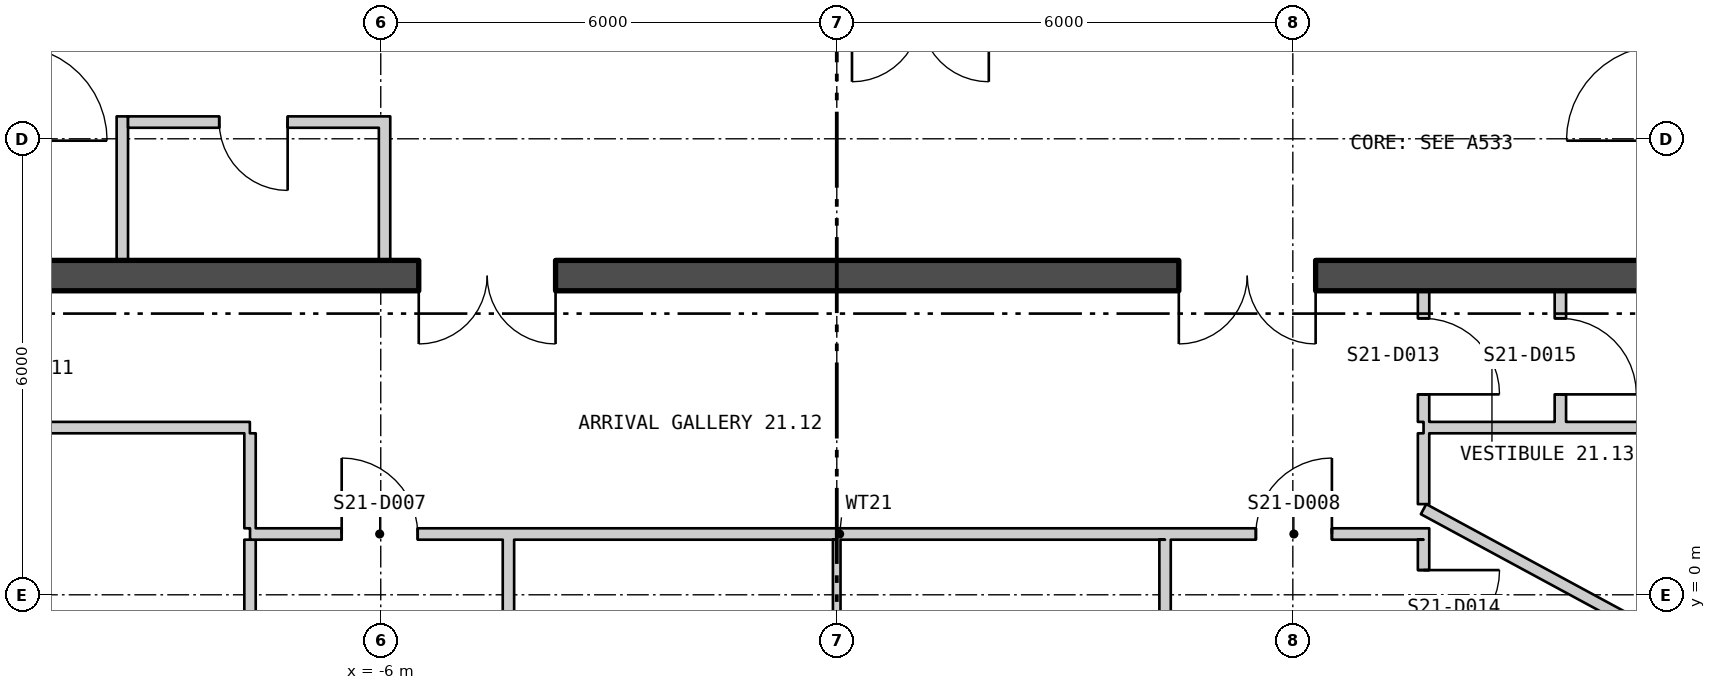
"""IFC4 building model, lengths in metres.
Left out: names, types, materials, properties, quantities, classifications, styles, units other than length and angle.
Written with IfcOpenShell. Run it as: python <this file> out.ifc"""

import sys

from ifc_helpers import new_model, si_unit, direction, frame, frame_2d, origin, place, context, subcontext, project, spatial, polyline, rectangle, outline, extrude, element, fill, save


model = new_model("IFC4")
c1 = context("Model", 3, precision=1e-05, world=origin(), true_north=direction((0.0, 1.0)))
c2 = subcontext(c1, "Body", "Model", "MODEL_VIEW")
j1 = project(units=[si_unit("LENGTHUNIT", "METRE"), si_unit("PLANEANGLEUNIT", "RADIAN")], contexts=[c1])
p1 = place(None, origin())
s1 = spatial("IfcSite", under=j1, at=p1, CompositionType="ELEMENT")
p2 = place(p1, origin())
s2 = spatial("IfcBuilding", under=s1, at=p2, CompositionType="ELEMENT")
p3 = place(p2, frame((0.0, 0.0, 280.5)))
s3 = spatial("IfcBuildingStorey", under=s2, at=p3, CompositionType="ELEMENT", Elevation=280.5)
p4 = place(p3, frame((-25.385, 15.619, -0.18), z_axis=(0.0, 0.0, 1.0), x_axis=(0.500000711659, -0.866024992908, 0.0)))
e1 = element("IfcWall", 1, at=p4, inside=s3, PredefinedType="SOLIDWALL", context=c2, shape_type="SweptSolid", body=[
    extrude(outline(polyline([(-0.13, -0.225), (45.87, -0.225), (45.61, 0.225), (0.13, 0.225), (-0.13, -0.225)])), origin(), (0.0, 0.0, 1.0), 3.68),
])
p5 = place(p4, frame((1.424, 0.0, 1.08)))
e2 = element("IfcOpeningElement", 2, at=p5, cuts=e1, PredefinedType="OPENING", context=c2, shape_type="SweptSolid", body=[
    extrude(rectangle(XDim=2.4, YDim=2.0, at=frame_2d((1.2, 1.0))), frame((0.0, 0.235, 0.0), z_axis=(0.0, -1.0, 0.0), x_axis=(1.0, 0.0, 0.0)), (0.0, 0.0, 1.0), 0.47),
])
p6 = place(p4, frame((5.893, 0.0, 1.08)))
e3 = element("IfcOpeningElement", 3, at=p6, cuts=e1, PredefinedType="OPENING", context=c2, shape_type="SweptSolid", body=[
    extrude(rectangle(XDim=2.4, YDim=2.0, at=frame_2d((1.2, 1.0))), frame((0.0, 0.235, 0.0), z_axis=(0.0, -1.0, 0.0), x_axis=(1.0, 0.0, 0.0)), (0.0, 0.0, 1.0), 0.47),
])
p7 = place(p4, frame((10.401, 0.0, 1.08)))
e4 = element("IfcOpeningElement", 4, at=p7, cuts=e1, PredefinedType="OPENING", context=c2, shape_type="SweptSolid", body=[
    extrude(rectangle(XDim=2.4, YDim=2.0, at=frame_2d((1.2, 1.0))), frame((0.0, 0.235, 0.0), z_axis=(0.0, -1.0, 0.0), x_axis=(1.0, 0.0, 0.0)), (0.0, 0.0, 1.0), 0.47),
])
p8 = place(p4, frame((14.909, 0.0, 1.08)))
e5 = element("IfcOpeningElement", 5, at=p8, cuts=e1, PredefinedType="OPENING", context=c2, shape_type="SweptSolid", body=[
    extrude(rectangle(XDim=2.4, YDim=2.0, at=frame_2d((1.2, 1.0))), frame((0.0, 0.235, 0.0), z_axis=(0.0, -1.0, 0.0), x_axis=(1.0, 0.0, 0.0)), (0.0, 0.0, 1.0), 0.47),
])
p9 = place(p4, frame((19.416, 0.0, 1.08)))
e6 = element("IfcOpeningElement", 6, at=p9, cuts=e1, PredefinedType="OPENING", context=c2, shape_type="SweptSolid", body=[
    extrude(rectangle(XDim=2.4, YDim=2.0, at=frame_2d((1.2, 1.0))), frame((0.0, 0.235, 0.0), z_axis=(0.0, -1.0, 0.0), x_axis=(1.0, 0.0, 0.0)), (0.0, 0.0, 1.0), 0.47),
])
p10 = place(p4, frame((23.924, 0.0, 1.08)))
e7 = element("IfcOpeningElement", 7, at=p10, cuts=e1, PredefinedType="OPENING", context=c2, shape_type="SweptSolid", body=[
    extrude(rectangle(XDim=2.4, YDim=2.0, at=frame_2d((1.2, 1.0))), frame((0.0, 0.235, 0.0), z_axis=(0.0, -1.0, 0.0), x_axis=(1.0, 0.0, 0.0)), (0.0, 0.0, 1.0), 0.47),
])
p11 = place(p4, frame((28.431, 0.0, 1.08)))
e8 = element("IfcOpeningElement", 8, at=p11, cuts=e1, PredefinedType="OPENING", context=c2, shape_type="SweptSolid", body=[
    extrude(rectangle(XDim=2.4, YDim=2.0, at=frame_2d((1.2, 1.0))), frame((0.0, 0.235, 0.0), z_axis=(0.0, -1.0, 0.0), x_axis=(1.0, 0.0, 0.0)), (0.0, 0.0, 1.0), 0.47),
])
p12 = place(p4, frame((32.939, 0.0, 1.08)))
e9 = element("IfcOpeningElement", 9, at=p12, cuts=e1, PredefinedType="OPENING", context=c2, shape_type="SweptSolid", body=[
    extrude(rectangle(XDim=2.4, YDim=2.0, at=frame_2d((1.2, 1.0))), frame((0.0, 0.235, 0.0), z_axis=(0.0, -1.0, 0.0), x_axis=(1.0, 0.0, 0.0)), (0.0, 0.0, 1.0), 0.47),
])
p13 = place(p4, frame((37.447, 0.0, 1.08)))
e10 = element("IfcOpeningElement", 10, at=p13, cuts=e1, PredefinedType="OPENING", context=c2, shape_type="SweptSolid", body=[
    extrude(rectangle(XDim=2.4, YDim=2.0, at=frame_2d((1.2, 1.0))), frame((0.0, 0.235, 0.0), z_axis=(0.0, -1.0, 0.0), x_axis=(1.0, 0.0, 0.0)), (0.0, 0.0, 1.0), 0.47),
])
p14 = place(p4, frame((41.916, 0.0, 1.08)))
e11 = element("IfcOpeningElement", 11, at=p14, cuts=e1, PredefinedType="OPENING", context=c2, shape_type="SweptSolid", body=[
    extrude(rectangle(XDim=2.4, YDim=2.0, at=frame_2d((1.2, 1.0))), frame((0.0, 0.235, 0.0), z_axis=(0.0, -1.0, 0.0), x_axis=(1.0, 0.0, 0.0)), (0.0, 0.0, 1.0), 0.47),
])
p15 = place(p3, frame((2.515, -23.993, -0.18), z_axis=(0.0, 0.0, 1.0), x_axis=(0.500000711659, 0.866024992908, 0.0)))
e12 = element("IfcWall", 12, at=p15, inside=s3, PredefinedType="SOLIDWALL", context=c2, shape_type="SweptSolid", body=[
    extrude(outline(polyline([(-0.13, -0.225), (45.87, -0.225), (45.61, 0.225), (0.13, 0.225), (-0.13, -0.225)])), origin(), (0.0, 0.0, 1.0), 3.68),
])
p16 = place(p15, frame((1.424, 0.0, 1.08)))
e13 = element("IfcOpeningElement", 13, at=p16, cuts=e12, PredefinedType="OPENING", context=c2, shape_type="SweptSolid", body=[
    extrude(rectangle(XDim=2.4, YDim=2.0, at=frame_2d((1.2, 1.0))), frame((0.0, 0.235, 0.0), z_axis=(0.0, -1.0, 0.0), x_axis=(1.0, 0.0, 0.0)), (0.0, 0.0, 1.0), 0.47),
])
p17 = place(p15, frame((5.893, 0.0, 1.08)))
e14 = element("IfcOpeningElement", 14, at=p17, cuts=e12, PredefinedType="OPENING", context=c2, shape_type="SweptSolid", body=[
    extrude(rectangle(XDim=2.4, YDim=2.0, at=frame_2d((1.2, 1.0))), frame((0.0, 0.235, 0.0), z_axis=(0.0, -1.0, 0.0), x_axis=(1.0, 0.0, 0.0)), (0.0, 0.0, 1.0), 0.47),
])
p18 = place(p15, frame((10.401, 0.0, 1.08)))
e15 = element("IfcOpeningElement", 15, at=p18, cuts=e12, PredefinedType="OPENING", context=c2, shape_type="SweptSolid", body=[
    extrude(rectangle(XDim=2.4, YDim=2.0, at=frame_2d((1.2, 1.0))), frame((0.0, 0.235, 0.0), z_axis=(0.0, -1.0, 0.0), x_axis=(1.0, 0.0, 0.0)), (0.0, 0.0, 1.0), 0.47),
])
p19 = place(p15, frame((14.909, 0.0, 1.08)))
e16 = element("IfcOpeningElement", 16, at=p19, cuts=e12, PredefinedType="OPENING", context=c2, shape_type="SweptSolid", body=[
    extrude(rectangle(XDim=2.4, YDim=2.0, at=frame_2d((1.2, 1.0))), frame((0.0, 0.235, 0.0), z_axis=(0.0, -1.0, 0.0), x_axis=(1.0, 0.0, 0.0)), (0.0, 0.0, 1.0), 0.47),
])
p20 = place(p15, frame((19.416, 0.0, 1.08)))
e17 = element("IfcOpeningElement", 17, at=p20, cuts=e12, PredefinedType="OPENING", context=c2, shape_type="SweptSolid", body=[
    extrude(rectangle(XDim=2.4, YDim=2.0, at=frame_2d((1.2, 1.0))), frame((0.0, 0.235, 0.0), z_axis=(0.0, -1.0, 0.0), x_axis=(1.0, 0.0, 0.0)), (0.0, 0.0, 1.0), 0.47),
])
p21 = place(p15, frame((28.431, 0.0, 1.08)))
e18 = element("IfcOpeningElement", 18, at=p21, cuts=e12, PredefinedType="OPENING", context=c2, shape_type="SweptSolid", body=[
    extrude(rectangle(XDim=2.4, YDim=2.0, at=frame_2d((1.2, 1.0))), frame((0.0, 0.235, 0.0), z_axis=(0.0, -1.0, 0.0), x_axis=(1.0, 0.0, 0.0)), (0.0, 0.0, 1.0), 0.47),
])
p22 = place(p15, frame((37.447, 0.0, 1.08)))
e19 = element("IfcOpeningElement", 19, at=p22, cuts=e12, PredefinedType="OPENING", context=c2, shape_type="SweptSolid", body=[
    extrude(rectangle(XDim=2.4, YDim=2.0, at=frame_2d((1.2, 1.0))), frame((0.0, 0.235, 0.0), z_axis=(0.0, -1.0, 0.0), x_axis=(1.0, 0.0, 0.0)), (0.0, 0.0, 1.0), 0.47),
])
p23 = place(p15, frame((41.916, 0.0, 1.08)))
e20 = element("IfcOpeningElement", 20, at=p23, cuts=e12, PredefinedType="OPENING", context=c2, shape_type="SweptSolid", body=[
    extrude(rectangle(XDim=2.4, YDim=2.0, at=frame_2d((1.2, 1.0))), frame((0.0, 0.235, 0.0), z_axis=(0.0, -1.0, 0.0), x_axis=(1.0, 0.0, 0.0)), (0.0, 0.0, 1.0), 0.47),
])
p24 = place(p3, frame((-14.5, 4.2, 0.0), z_axis=(0.0, 0.0, 1.0), x_axis=(1.0, 0.0, 0.0)))
e21 = element("IfcWall", 21, at=p24, inside=s3, PredefinedType="SHEAR", context=c2, shape_type="SweptSolid", body=[
    extrude(rectangle(XDim=29.0, YDim=0.4, at=frame_2d((14.5, 0.0))), origin(), (0.0, 0.0, 1.0), 3.7),
])
p25 = place(p24, frame((9.0, 0.0, 0.0)))
e22 = element("IfcOpeningElement", 22, at=p25, cuts=e21, PredefinedType="OPENING", context=c2, shape_type="SweptSolid", body=[
    extrude(rectangle(XDim=1.8, YDim=2.4, at=frame_2d((0.9, 1.2))), frame((0.0, 0.21, 0.0), z_axis=(0.0, -1.0, 0.0), x_axis=(1.0, 0.0, 0.0)), (0.0, 0.0, 1.0), 0.42),
])
p26 = place(p24, frame((19.0, 0.0, 0.0)))
e23 = element("IfcOpeningElement", 23, at=p26, cuts=e21, PredefinedType="OPENING", context=c2, shape_type="SweptSolid", body=[
    extrude(rectangle(XDim=1.8, YDim=2.4, at=frame_2d((0.9, 1.2))), frame((0.0, 0.21, 0.0), z_axis=(0.0, -1.0, 0.0), x_axis=(1.0, 0.0, 0.0)), (0.0, 0.0, 1.0), 0.42),
])
for number, where, z_axis, x_axis in (
    (24, (-9.4, 4.4, 0.0), (0.0, 0.0, 1.0), (0.0, 1.0, 0.0)),
    (25, (-5.95, 4.4, 0.0), (0.0, 0.0, 1.0), (0.0, 1.0, 0.0)),
):
    element("IfcWall", number, at=place(p3, frame(where, z_axis=z_axis, x_axis=x_axis)), inside=s3, PredefinedType="PARTITIONING", context=c2, shape_type="SweptSolid", body=[
        extrude(rectangle(XDim=1.895, YDim=0.15, at=frame_2d((0.948, 0.0))), origin(), (0.0, 0.0, 1.0), 3.7),
    ])
p27 = place(p3, frame((-9.325, 6.22, 0.0), z_axis=(0.0, 0.0, 1.0), x_axis=(1.0, 0.0, 0.0)))
e26 = element("IfcWall", 26, at=p27, inside=s3, PredefinedType="PARTITIONING", context=c2, shape_type="SweptSolid", body=[
    extrude(rectangle(XDim=3.3, YDim=0.15, at=frame_2d((1.65, 0.0))), origin(), (0.0, 0.0, 1.0), 3.7),
])
p28 = place(p27, frame((1.2, 0.0, 0.0)))
e27 = element("IfcOpeningElement", 27, at=p28, cuts=e26, PredefinedType="OPENING", context=c2, shape_type="SweptSolid", body=[
    extrude(rectangle(XDim=0.9, YDim=2.1, at=frame_2d((0.45, 1.05))), frame((0.0, 0.085, 0.0), z_axis=(0.0, -1.0, 0.0), x_axis=(1.0, 0.0, 0.0)), (0.0, 0.0, 1.0), 0.17),
])
p29 = place(p3, frame((-16.225, 2.2, 0.0), z_axis=(0.0, 0.0, 1.0), x_axis=(1.0, 0.0, 0.0)))
e28 = element("IfcWall", 28, at=p29, inside=s3, PredefinedType="PARTITIONING", context=c2, shape_type="SweptSolid", body=[
    extrude(rectangle(XDim=8.503, YDim=0.15, at=frame_2d((4.252, 0.0))), origin(), (0.0, 0.0, 1.0), 3.7),
])
p30 = place(p3, frame((-7.72, -0.588, 0.0), z_axis=(0.0, 0.0, 1.0), x_axis=(0.0, 1.0, 0.0)))
e29 = element("IfcWall", 29, at=p30, inside=s3, PredefinedType="PARTITIONING", context=c2, shape_type="SweptSolid", body=[
    extrude(rectangle(XDim=1.313, YDim=0.15, at=frame_2d((0.656, 0.0))), origin(), (0.0, 0.0, 1.0), 3.7),
])
p31 = place(p3, frame((-7.72, 0.8, 0.0), z_axis=(0.0, 0.0, 1.0), x_axis=(1.0, 0.0, 0.0)))
e30 = element("IfcWall", 30, at=p31, inside=s3, PredefinedType="PARTITIONING", context=c2, shape_type="SweptSolid", body=[
    extrude(rectangle(XDim=15.515, YDim=0.15, at=frame_2d((7.758, 0.0))), origin(), (0.0, 0.0, 1.0), 3.7),
])
p32 = place(p31, frame((1.206, 0.0, 0.0)))
e31 = element("IfcOpeningElement", 31, at=p32, cuts=e30, PredefinedType="OPENING", context=c2, shape_type="SweptSolid", body=[
    extrude(rectangle(XDim=1.0, YDim=2.1, at=frame_2d((0.5, 1.05))), frame((0.0, 0.085, 0.0), z_axis=(0.0, -1.0, 0.0), x_axis=(1.0, 0.0, 0.0)), (0.0, 0.0, 1.0), 0.17),
])
p33 = place(p31, frame((13.234, 0.0, 0.0)))
e32 = element("IfcOpeningElement", 32, at=p33, cuts=e30, PredefinedType="OPENING", context=c2, shape_type="SweptSolid", body=[
    extrude(rectangle(XDim=1.0, YDim=2.1, at=frame_2d((0.5, 1.05))), frame((0.0, 0.085, 0.0), z_axis=(0.0, -1.0, 0.0), x_axis=(1.0, 0.0, 0.0)), (0.0, 0.0, 1.0), 0.17),
])
p34 = place(p3, frame((-7.72, 0.875, 0.0), z_axis=(0.0, 0.0, 1.0), x_axis=(0.0, 1.0, 0.0)))
e33 = element("IfcWall", 33, at=p34, inside=s3, PredefinedType="PARTITIONING", context=c2, shape_type="SweptSolid", body=[
    extrude(rectangle(XDim=1.25, YDim=0.15, at=frame_2d((0.625, 0.0))), origin(), (0.0, 0.0, 1.0), 3.7),
])
p35 = place(p3, frame((-4.32, -3.48, 0.0), z_axis=(0.0, 0.0, 1.0), x_axis=(0.0, 1.0, 0.0)))
e34 = element("IfcWall", 34, at=p35, inside=s3, PredefinedType="PARTITIONING", context=c2, shape_type="SweptSolid", body=[
    extrude(rectangle(XDim=4.205, YDim=0.15, at=frame_2d((2.103, 0.0))), origin(), (0.0, 0.0, 1.0), 3.7),
])
p36 = place(p35, frame((0.2, 0.0, 0.0)))
e35 = element("IfcOpeningElement", 35, at=p36, cuts=e34, PredefinedType="OPENING", context=c2, shape_type="SweptSolid", body=[
    extrude(rectangle(XDim=1.0, YDim=2.1, at=frame_2d((0.5, 1.05))), frame((0.0, 0.085, 0.0), z_axis=(0.0, -1.0, 0.0), x_axis=(1.0, 0.0, 0.0)), (0.0, 0.0, 1.0), 0.17),
])
p37 = place(p3, frame((-0.001, 0.725, 0.0), z_axis=(0.0, 0.0, 1.0), x_axis=(0.000235294111, -0.999999972318, 0.0)))
e36 = element("IfcWall", 36, at=p37, inside=s3, PredefinedType="PARTITIONING", context=c2, shape_type="SweptSolid", body=[
    extrude(rectangle(XDim=3.825, YDim=0.1, at=frame_2d((1.913, 0.0))), origin(), (0.0, 0.0, 1.0), 3.2),
])
p38 = place(p3, frame((4.319, 0.725, 0.0), z_axis=(0.0, 0.0, 1.0), x_axis=(0.000237812122, -0.999999971723, 0.0)))
e37 = element("IfcWall", 37, at=p38, inside=s3, PredefinedType="PARTITIONING", context=c2, shape_type="SweptSolid", body=[
    extrude(rectangle(XDim=4.205, YDim=0.15, at=frame_2d((2.103, 0.0))), origin(), (0.0, 0.0, 1.0), 3.7),
])
p39 = place(p38, frame((3.005, 0.0, 0.0)))
e38 = element("IfcOpeningElement", 38, at=p39, cuts=e37, PredefinedType="OPENING", context=c2, shape_type="SweptSolid", body=[
    extrude(rectangle(XDim=1.0, YDim=2.1, at=frame_2d((0.5, 1.05))), frame((0.0, 0.085, 0.0), z_axis=(0.0, -1.0, 0.0), x_axis=(1.0, 0.0, 0.0)), (0.0, 0.0, 1.0), 0.17),
])
p40 = place(p3, frame((7.72, 1.127, 0.0), z_axis=(0.0, 0.0, 1.0), x_axis=(0.879447920674, -0.475995120586, 0.0)))
e39 = element("IfcWall", 39, at=p40, inside=s3, PredefinedType="PARTITIONING", context=c2, shape_type="SweptSolid", body=[
    extrude(rectangle(XDim=7.83, YDim=0.15, at=frame_2d((3.915, 0.0))), origin(), (0.0, 0.0, 1.0), 3.7),
])
p41 = place(p3, frame((7.72, 1.193, 0.0), z_axis=(0.0, 0.0, 1.0), x_axis=(0.0, 1.0, 0.0)))
e40 = element("IfcWall", 40, at=p41, inside=s3, PredefinedType="PARTITIONING", context=c2, shape_type="SweptSolid", body=[
    extrude(rectangle(XDim=0.932, YDim=0.15, at=frame_2d((0.466, 0.0))), origin(), (0.0, 0.0, 1.0), 3.7),
])
p42 = place(p3, frame((7.72, 2.2, 0.0), z_axis=(0.0, 0.0, 1.0), x_axis=(1.0, 0.0, 0.0)))
e41 = element("IfcWall", 41, at=p42, inside=s3, PredefinedType="PARTITIONING", context=c2, shape_type="SweptSolid", body=[
    extrude(rectangle(XDim=8.505, YDim=0.15, at=frame_2d((4.253, 0.0))), origin(), (0.0, 0.0, 1.0), 3.7),
])
p43 = place(p3, frame((7.72, 2.275, 0.0), z_axis=(0.0, 0.0, 1.0), x_axis=(0.0, 1.0, 0.0)))
e42 = element("IfcWall", 42, at=p43, inside=s3, PredefinedType="PARTITIONING", context=c2, shape_type="SweptSolid", body=[
    extrude(rectangle(XDim=1.725, YDim=0.15, at=frame_2d((0.863, 0.0))), origin(), (0.0, 0.0, 1.0), 3.7),
])
p44 = place(p43, frame((0.362, 0.0, 0.0)))
e43 = element("IfcOpeningElement", 43, at=p44, cuts=e42, PredefinedType="OPENING", context=c2, shape_type="SweptSolid", body=[
    extrude(rectangle(XDim=1.0, YDim=2.1, at=frame_2d((0.5, 1.05))), frame((0.0, 0.085, 0.0), z_axis=(0.0, -1.0, 0.0), x_axis=(1.0, 0.0, 0.0)), (0.0, 0.0, 1.0), 0.17),
])
p45 = place(p3, frame((7.72, 0.725, 0.0), z_axis=(0.0, 0.0, 1.0), x_axis=(0.000153657036, -0.999999988195, 0.0)))
e44 = element("IfcWall", 44, at=p45, inside=s3, PredefinedType="PARTITIONING", context=c2, shape_type="SweptSolid", body=[
    extrude(rectangle(XDim=6.508, YDim=0.15, at=frame_2d((3.254, 0.0))), origin(), (0.0, 0.0, 1.0), 3.7),
])
p46 = place(p45, frame((0.4, 0.0, 0.0)))
e45 = element("IfcOpeningElement", 45, at=p46, cuts=e44, PredefinedType="OPENING", context=c2, shape_type="SweptSolid", body=[
    extrude(rectangle(XDim=1.0, YDim=2.1, at=frame_2d((0.5, 1.05))), frame((0.0, 0.085, 0.0), z_axis=(0.0, -1.0, 0.0), x_axis=(1.0, 0.0, 0.0)), (0.0, 0.0, 1.0), 0.17),
])
p47 = place(p3, frame((9.52, 2.275, 0.0), z_axis=(0.0, 0.0, 1.0), x_axis=(0.0, 1.0, 0.0)))
e46 = element("IfcWall", 46, at=p47, inside=s3, PredefinedType="PARTITIONING", context=c2, shape_type="SweptSolid", body=[
    extrude(rectangle(XDim=1.725, YDim=0.15, at=frame_2d((0.863, 0.0))), origin(), (0.0, 0.0, 1.0), 3.2),
])
p48 = place(p47, frame((0.362, 0.0, 0.0)))
e47 = element("IfcOpeningElement", 47, at=p48, cuts=e46, PredefinedType="OPENING", context=c2, shape_type="SweptSolid", body=[
    extrude(rectangle(XDim=1.0, YDim=2.1, at=frame_2d((0.5, 1.05))), frame((0.0, 0.085, 0.0), z_axis=(0.0, -1.0, 0.0), x_axis=(1.0, 0.0, 0.0)), (0.0, 0.0, 1.0), 0.17),
])
p49 = place(p28, origin())
e48 = element("IfcDoor", 48, at=p49, inside=s3, OperationType="SINGLE_SWING_RIGHT", PredefinedType="DOOR", context=c2, shape_type="SweptSolid", body=[
    extrude(rectangle(XDim=0.9, YDim=2.1, at=frame_2d((0.45, 1.05))), frame((0.0, 0.025, 0.0), z_axis=(0.0, -1.0, 0.0), x_axis=(1.0, 0.0, 0.0)), (0.0, 0.0, 1.0), 0.05),
])
fill(e27, e48)
p50 = place(p25, origin())
e49 = element("IfcDoor", 49, at=p50, inside=s3, OperationType="DOUBLE_DOOR_SINGLE_SWING", PredefinedType="DOOR", context=c2, shape_type="SweptSolid", body=[
    extrude(rectangle(XDim=1.8, YDim=2.4, at=frame_2d((0.9, 1.2))), frame((0.0, 0.025, 0.0), z_axis=(0.0, -1.0, 0.0), x_axis=(1.0, 0.0, 0.0)), (0.0, 0.0, 1.0), 0.05),
])
fill(e22, e49)
p51 = place(p26, origin())
e50 = element("IfcDoor", 50, at=p51, inside=s3, OperationType="DOUBLE_DOOR_SINGLE_SWING", PredefinedType="DOOR", context=c2, shape_type="SweptSolid", body=[
    extrude(rectangle(XDim=1.8, YDim=2.4, at=frame_2d((0.9, 1.2))), frame((0.0, 0.025, 0.0), z_axis=(0.0, -1.0, 0.0), x_axis=(1.0, 0.0, 0.0)), (0.0, 0.0, 1.0), 0.05),
])
fill(e23, e50)
p52 = place(p32, origin())
e51 = element("IfcDoor", 51, at=p52, inside=s3, OperationType="SINGLE_SWING_RIGHT", PredefinedType="DOOR", context=c2, shape_type="SweptSolid", body=[
    extrude(rectangle(XDim=1.0, YDim=2.1, at=frame_2d((0.5, 1.05))), frame((0.0, 0.025, 0.0), z_axis=(0.0, -1.0, 0.0), x_axis=(1.0, 0.0, 0.0)), (0.0, 0.0, 1.0), 0.05),
])
fill(e31, e51)
p53 = place(p33, origin())
e52 = element("IfcDoor", 52, at=p53, inside=s3, OperationType="SINGLE_SWING_LEFT", PredefinedType="DOOR", context=c2, shape_type="SweptSolid", body=[
    extrude(rectangle(XDim=1.0, YDim=2.1, at=frame_2d((0.5, 1.05))), frame((0.0, 0.025, 0.0), z_axis=(0.0, -1.0, 0.0), x_axis=(1.0, 0.0, 0.0)), (0.0, 0.0, 1.0), 0.05),
])
fill(e32, e52)
p54 = place(p44, origin())
e53 = element("IfcDoor", 53, at=p54, inside=s3, OperationType="SINGLE_SWING_LEFT", PredefinedType="DOOR", context=c2, shape_type="SweptSolid", body=[
    extrude(rectangle(XDim=1.0, YDim=2.1, at=frame_2d((0.5, 1.05))), frame((0.0, 0.025, 0.0), z_axis=(0.0, -1.0, 0.0), x_axis=(1.0, 0.0, 0.0)), (0.0, 0.0, 1.0), 0.05),
])
fill(e43, e53)
p55 = place(p46, origin())
e54 = element("IfcDoor", 54, at=p55, inside=s3, OperationType="SINGLE_SWING_RIGHT", PredefinedType="DOOR", context=c2, shape_type="SweptSolid", body=[
    extrude(rectangle(XDim=1.0, YDim=2.1, at=frame_2d((0.5, 1.05))), frame((0.0, 0.025, 0.0), z_axis=(0.0, -1.0, 0.0), x_axis=(1.0, 0.0, 0.0)), (0.0, 0.0, 1.0), 0.05),
])
fill(e45, e54)
p56 = place(p48, origin())
e55 = element("IfcDoor", 55, at=p56, inside=s3, OperationType="SINGLE_SWING_LEFT", PredefinedType="DOOR", context=c2, shape_type="SweptSolid", body=[
    extrude(rectangle(XDim=1.0, YDim=2.1, at=frame_2d((0.5, 1.05))), frame((0.0, 0.025, 0.0), z_axis=(0.0, -1.0, 0.0), x_axis=(1.0, 0.0, 0.0)), (0.0, 0.0, 1.0), 0.05),
])
fill(e47, e55)
save(model, sys.argv[1])
